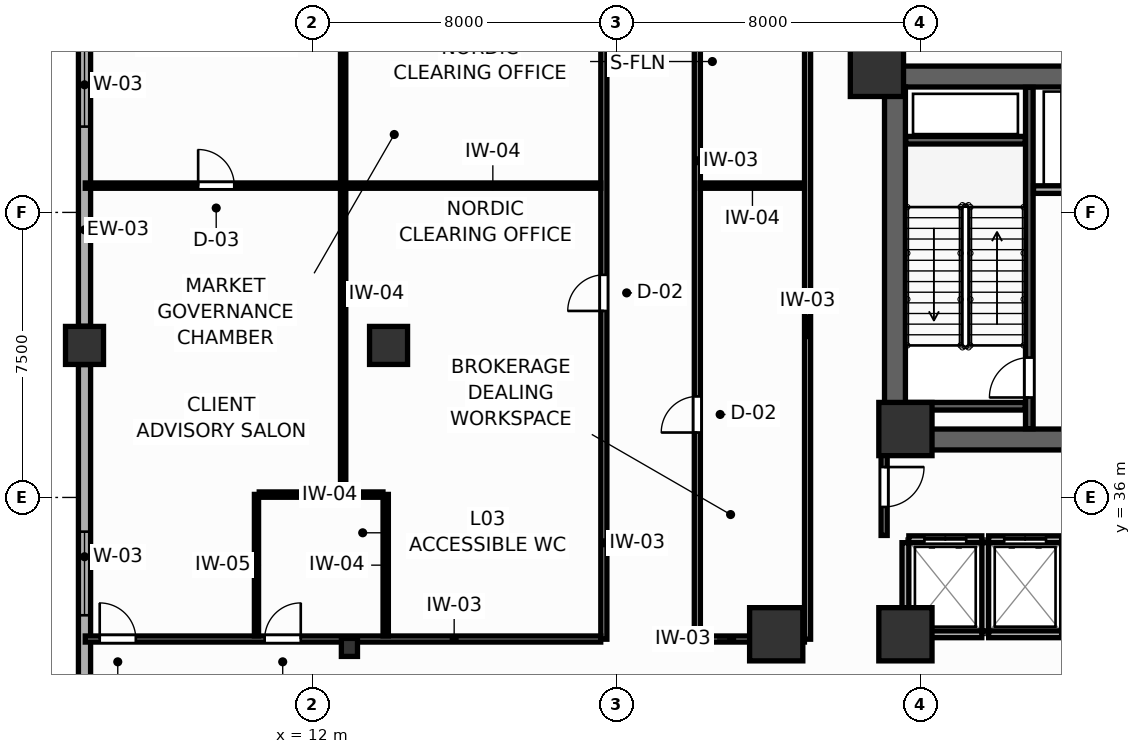
"""IFC4 building model, lengths in metres.
Left out: names, types, materials, properties, quantities, classifications, styles, units other than length and angle.
Written with IfcOpenShell. Run it as: python <this file> out.ifc"""

import sys

from ifc_helpers import new_model, si_unit, direction, frame, frame_2d, origin, origin_2d, place, context, subcontext, project, spatial, rectangle, i_section, extrude, source, transform, mapped, element, fill, save


model = new_model("IFC4")
c1 = context("Model", 3, precision=1e-05, world=origin(), true_north=direction((0.0, 1.0)))
c2 = subcontext(c1, "Body", "Model", "MODEL_VIEW")
j1 = project(units=[si_unit("LENGTHUNIT", "METRE"), si_unit("PLANEANGLEUNIT", "RADIAN")], contexts=[c1])
p1 = place(None, origin())
s1 = spatial("IfcSite", under=j1, at=p1, CompositionType="ELEMENT")
p2 = place(p1, origin())
s2 = spatial("IfcBuilding", under=s1, at=p2, CompositionType="ELEMENT")
p3 = place(p2, frame((0.0, 0.0, 14.4)))
s3 = spatial("IfcBuildingStorey", under=s2, at=p3, CompositionType="ELEMENT", Elevation=14.4)
p4 = place(p3, frame((27.05, 47.075, 0.0), z_axis=(0.0, 0.0, 1.0), x_axis=(1.0, 0.0, 0.0)))
e1 = element("IfcWall", 1, at=p4, inside=s3, PredefinedType="SHEAR", context=c2, shape_type="SweptSolid", body=[
    extrude(rectangle(XDim=17.9, YDim=0.55, at=frame_2d((8.95, 0.0))), origin(), (0.0, 0.0, 1.0), 4.8),
])
p5 = place(p3, frame((27.05, 37.525, 0.0), z_axis=(0.0, 0.0, 1.0), x_axis=(1.0, 0.0, 0.0)))
e2 = element("IfcWall", 2, at=p5, inside=s3, PredefinedType="SHEAR", context=c2, shape_type="SweptSolid", body=[
    extrude(rectangle(XDim=17.9, YDim=0.55, at=frame_2d((8.95, 0.0))), origin(), (0.0, 0.0, 1.0), 4.8),
])
p6 = place(p5, frame((4.975, 0.0, 0.0)))
e3 = element("IfcOpeningElement", 3, at=p6, cuts=e2, PredefinedType="OPENING", context=c2, shape_type="SweptSolid", body=[
    extrude(rectangle(XDim=1.05, YDim=2.1, at=frame_2d((0.525, 1.05))), frame((0.0, 0.285, 0.0), z_axis=(0.0, -1.0, 0.0), x_axis=(1.0, 0.0, 0.0)), (0.0, 0.0, 1.0), 0.57),
])
p7 = place(p5, frame((11.875, 0.0, 0.0)))
e4 = element("IfcOpeningElement", 4, at=p7, cuts=e2, PredefinedType="OPENING", context=c2, shape_type="SweptSolid", body=[
    extrude(rectangle(XDim=1.05, YDim=2.1, at=frame_2d((0.525, 1.05))), frame((0.0, 0.285, 0.0), z_axis=(0.0, -1.0, 0.0), x_axis=(1.0, 0.0, 0.0)), (0.0, 0.0, 1.0), 0.57),
])
p8 = place(p3, frame((27.325, 37.8, 0.0), z_axis=(0.0, 0.0, 1.0), x_axis=(0.0, 1.0, 0.0)))
e5 = element("IfcWall", 5, at=p8, inside=s3, PredefinedType="SHEAR", context=c2, shape_type="SweptSolid", body=[
    extrude(rectangle(XDim=9.0, YDim=0.55, at=frame_2d((4.5, 0.0))), origin(), (0.0, 0.0, 1.0), 4.8),
])
m1 = source(origin(), c2, "Body", "SweptSolid", [
    extrude(rectangle(XDim=1.4, YDim=1.4, at=origin_2d()), origin(), (0.0, 0.0, 1.0), 4.8),
])
for number, where, z_axis, x_axis in (
    (6, (26.85, 47.25, 0.0), (0.0, 0.0, 1.0), (1.0, 0.0, 0.0)),
    (7, (27.6, 37.8, 0.0), (0.0, 0.0, 1.0), (1.0, 0.0, 0.0)),
    (8, (27.6, 32.4, 0.0), (0.0, 0.0, 1.0), (1.0, 0.0, 0.0)),
    (9, (24.2, 32.4, 0.0), (0.0, 0.0, 1.0), (1.0, 0.0, 0.0)),
):
    element("IfcColumn", number, at=place(p3, frame(where, z_axis=z_axis, x_axis=x_axis)), inside=s3, PredefinedType="COLUMN", context=c2, shape_type="MappedRepresentation", body=[
        mapped(m1, transform((0.0, 0.0, 0.0), scale=1.0)),
    ])
m2 = source(origin(), c2, "Body", "SweptSolid", [
    extrude(rectangle(XDim=1.0, YDim=1.0, at=origin_2d()), origin(), (0.0, 0.0, 1.0), 4.8),
])
for number, where, z_axis, x_axis in (
    (10, (6.0, 40.0, 0.0), (0.0, 0.0, 1.0), (1.0, 0.0, 0.0)),
    (11, (14.0, 40.0, 0.0), (0.0, 0.0, 1.0), (1.0, 0.0, 0.0)),
):
    element("IfcColumn", number, at=place(p3, frame(where, z_axis=z_axis, x_axis=x_axis)), inside=s3, PredefinedType="COLUMN", context=c2, shape_type="MappedRepresentation", body=[
        mapped(m2, transform((0.0, 0.0, 0.0), scale=1.0)),
    ])
m3 = source(origin(), c2, "Body", "SweptSolid", [
    extrude(i_section(OverallWidth=0.424, OverallDepth=0.474, WebThickness=0.045, FlangeThickness=0.072, FilletRadius=0.015, at=origin_2d()), origin(), (0.0, 0.0, 1.0), 4.8),
])
p9 = place(p3, frame((12.97, 32.054, 0.0), z_axis=(0.0, 0.0, 1.0), x_axis=(1.0, 0.0, 0.0)))
e12 = element("IfcColumn", 12, at=p9, inside=s3, PredefinedType="COLUMN", context=c2, shape_type="MappedRepresentation", body=[
    mapped(m3, transform((0.0, 0.0, 0.0), scale=1.0)),
])
p10 = place(p3, frame((6.0, 28.505, 0.0), z_axis=(0.0, 0.0, 1.0), x_axis=(0.0, 1.0, 0.0)))
e13 = element("IfcWall", 13, at=p10, inside=s3, PredefinedType="SOLIDWALL", context=c2, shape_type="SweptSolid", body=[
    extrude(rectangle(XDim=10.99, YDim=0.32, at=frame_2d((5.495, 0.0))), origin(), (0.0, 0.0, 1.0), 3.82),
])
p11 = place(p10, frame((4.395, 0.0, 0.75)))
e14 = element("IfcOpeningElement", 14, at=p11, cuts=e13, PredefinedType="OPENING", context=c2, shape_type="SweptSolid", body=[
    extrude(rectangle(XDim=2.2, YDim=2.0, at=frame_2d((1.1, 1.0))), frame((0.0, 0.17, 0.0), z_axis=(0.0, -1.0, 0.0), x_axis=(1.0, 0.0, 0.0)), (0.0, 0.0, 1.0), 0.34),
])
p12 = place(p3, frame((6.0, 40.505, 0.0), z_axis=(0.0, 0.0, 1.0), x_axis=(0.0, 1.0, 0.0)))
e15 = element("IfcWall", 15, at=p12, inside=s3, PredefinedType="SOLIDWALL", context=c2, shape_type="SweptSolid", body=[
    extrude(rectangle(XDim=9.47, YDim=0.32, at=frame_2d((4.735, 0.0))), origin(), (0.0, 0.0, 1.0), 3.82),
])
p13 = place(p12, frame((5.253, 0.0, 0.75)))
e16 = element("IfcOpeningElement", 16, at=p13, cuts=e15, PredefinedType="OPENING", context=c2, shape_type="SweptSolid", body=[
    extrude(rectangle(XDim=2.2, YDim=2.0, at=frame_2d((1.1, 1.0))), frame((0.0, 0.17, 0.0), z_axis=(0.0, -1.0, 0.0), x_axis=(1.0, 0.0, 0.0)), (0.0, 0.0, 1.0), 0.34),
])
p14 = place(p3, frame((30.86, 37.81, 0.0), z_axis=(0.0, 0.0, 1.0), x_axis=(0.0, 1.0, 0.0)))
e17 = element("IfcWall", 17, at=p14, inside=s3, PredefinedType="SHEAR", context=c2, shape_type="SweptSolid", body=[
    extrude(rectangle(XDim=8.98, YDim=0.2, at=frame_2d((4.49, 0.0))), origin(), (0.0, 0.0, 1.0), 4.8),
])
p15 = place(p14, frame((0.82, 0.0, 0.0)))
e18 = element("IfcOpeningElement", 18, at=p15, cuts=e17, PredefinedType="OPENING", context=c2, shape_type="SweptSolid", body=[
    extrude(rectangle(XDim=1.05, YDim=2.1, at=frame_2d((0.525, 1.05))), frame((0.0, 0.11, 0.0), z_axis=(0.0, -1.0, 0.0), x_axis=(1.0, 0.0, 0.0)), (0.0, 0.0, 1.0), 0.22),
])
for number, where, z_axis, x_axis in (
    (19, (27.61, 45.4, 0.0), (0.0, 0.0, 1.0), (1.0, 0.0, 0.0)),
    (20, (27.61, 38.4, 0.0), (0.0, 0.0, 1.0), (1.0, 0.0, 0.0)),
):
    element("IfcWall", number, at=place(p3, frame(where, z_axis=z_axis, x_axis=x_axis)), inside=s3, PredefinedType="SHEAR", context=c2, shape_type="SweptSolid", body=[
        extrude(rectangle(XDim=3.14, YDim=0.2, at=frame_2d((1.57, 0.0))), origin(), (0.0, 0.0, 1.0), 4.8),
    ])
p16 = place(p3, frame((30.97, 44.1, 0.0), z_axis=(0.0, 0.0, 1.0), x_axis=(1.0, 0.0, 0.0)))
e21 = element("IfcWall", 21, at=p16, inside=s3, PredefinedType="PARTITIONING", context=c2, shape_type="SweptSolid", body=[
    extrude(rectangle(XDim=3.38, YDim=0.2, at=frame_2d((1.69, 0.0))), origin(), (0.0, 0.0, 1.0), 4.52),
])
p17 = place(p16, frame((0.9, 0.0, 0.0)))
e22 = element("IfcOpeningElement", 22, at=p17, cuts=e21, PredefinedType="OPENING", context=c2, shape_type="SweptSolid", body=[
    extrude(rectangle(XDim=1.2, YDim=2.1, at=frame_2d((0.6, 1.05))), frame((0.0, 0.11, 0.0), z_axis=(0.0, -1.0, 0.0), x_axis=(1.0, 0.0, 0.0)), (0.0, 0.0, 1.0), 0.22),
])
p18 = place(p3, frame((27.69, 34.9, 0.0), z_axis=(0.0, 0.0, 1.0), x_axis=(1.0, 0.0, 0.0)))
e23 = element("IfcWall", 23, at=p18, inside=s3, PredefinedType="PARTITIONING", context=c2, shape_type="SweptSolid", body=[
    extrude(rectangle(XDim=1.92, YDim=0.18, at=frame_2d((0.96, 0.0))), origin(), (0.0, 0.0, 1.0), 4.52),
])
p19 = place(p18, frame((0.41, 0.0, 0.0)))
e24 = element("IfcOpeningElement", 24, at=p19, cuts=e23, PredefinedType="OPENING", context=c2, shape_type="SweptSolid", body=[
    extrude(rectangle(XDim=1.1, YDim=2.1, at=frame_2d((0.55, 1.05))), frame((0.0, 0.1, 0.0), z_axis=(0.0, -1.0, 0.0), x_axis=(1.0, 0.0, 0.0)), (0.0, 0.0, 1.0), 0.2),
])
p20 = place(p3, frame((27.69, 32.4, 0.0), z_axis=(0.0, 0.0, 1.0), x_axis=(1.0, 0.0, 0.0)))
e25 = element("IfcWall", 25, at=p20, inside=s3, PredefinedType="PARTITIONING", context=c2, shape_type="SweptSolid", body=[
    extrude(rectangle(XDim=1.92, YDim=0.18, at=frame_2d((0.96, 0.0))), origin(), (0.0, 0.0, 1.0), 3.82),
])
p21 = place(p3, frame((27.6, 32.49, 0.0), z_axis=(0.0, 0.0, 1.0), x_axis=(0.0, 1.0, 0.0)))
e26 = element("IfcWall", 26, at=p21, inside=s3, PredefinedType="PARTITIONING", context=c2, shape_type="SweptSolid", body=[
    extrude(rectangle(XDim=2.32, YDim=0.18, at=frame_2d((1.16, 0.0))), origin(), (0.0, 0.0, 1.0), 4.52),
])
p22 = place(p3, frame((29.79, 34.9, 0.0), z_axis=(0.0, 0.0, 1.0), x_axis=(1.0, 0.0, 0.0)))
e27 = element("IfcWall", 27, at=p22, inside=s3, PredefinedType="PARTITIONING", context=c2, shape_type="SweptSolid", body=[
    extrude(rectangle(XDim=1.92, YDim=0.18, at=frame_2d((0.96, 0.0))), origin(), (0.0, 0.0, 1.0), 4.52),
])
p23 = place(p22, frame((0.41, 0.0, 0.0)))
e28 = element("IfcOpeningElement", 28, at=p23, cuts=e27, PredefinedType="OPENING", context=c2, shape_type="SweptSolid", body=[
    extrude(rectangle(XDim=1.1, YDim=2.1, at=frame_2d((0.55, 1.05))), frame((0.0, 0.1, 0.0), z_axis=(0.0, -1.0, 0.0), x_axis=(1.0, 0.0, 0.0)), (0.0, 0.0, 1.0), 0.2),
])
p24 = place(p3, frame((29.79, 32.4, 0.0), z_axis=(0.0, 0.0, 1.0), x_axis=(1.0, 0.0, 0.0)))
e29 = element("IfcWall", 29, at=p24, inside=s3, PredefinedType="PARTITIONING", context=c2, shape_type="SweptSolid", body=[
    extrude(rectangle(XDim=1.92, YDim=0.18, at=frame_2d((0.96, 0.0))), origin(), (0.0, 0.0, 1.0), 3.82),
])
p25 = place(p3, frame((29.7, 32.49, 0.0), z_axis=(0.0, 0.0, 1.0), x_axis=(0.0, 1.0, 0.0)))
e30 = element("IfcWall", 30, at=p25, inside=s3, PredefinedType="PARTITIONING", context=c2, shape_type="SweptSolid", body=[
    extrude(rectangle(XDim=2.32, YDim=0.18, at=frame_2d((1.16, 0.0))), origin(), (0.0, 0.0, 1.0), 4.52),
])
p26 = place(p3, frame((27.04, 35.0, 0.0), z_axis=(0.0, 0.0, 1.0), x_axis=(0.0, 1.0, 0.0)))
e31 = element("IfcWall", 31, at=p26, inside=s3, PredefinedType="PARTITIONING", context=c2, shape_type="SweptSolid", body=[
    extrude(rectangle(XDim=2.65, YDim=0.16, at=frame_2d((1.325, 0.0))), origin(), (0.0, 0.0, 1.0), 4.52),
])
p27 = place(p26, frame((0.75, 0.0, 0.0)))
e32 = element("IfcOpeningElement", 32, at=p27, cuts=e31, PredefinedType="OPENING", context=c2, shape_type="SweptSolid", body=[
    extrude(rectangle(XDim=1.05, YDim=2.1, at=frame_2d((0.525, 1.05))), frame((0.0, 0.09, 0.0), z_axis=(0.0, -1.0, 0.0), x_axis=(1.0, 0.0, 0.0)), (0.0, 0.0, 1.0), 0.18),
])
p28 = place(p3, frame((22.125, 32.27, 0.0), z_axis=(0.0, 0.0, 1.0), x_axis=(0.0, 1.0, 0.0)))
e33 = element("IfcWall", 33, at=p28, inside=s3, PredefinedType="PARTITIONING", context=c2, shape_type="SweptSolid", body=[
    extrude(rectangle(XDim=26.71, YDim=0.16, at=frame_2d((13.355, 0.0))), origin(), (0.0, 0.0, 1.0), 4.52),
])
p29 = place(p28, frame((5.438, 0.0, 0.0)))
e34 = element("IfcOpeningElement", 34, at=p29, cuts=e33, PredefinedType="OPENING", context=c2, shape_type="SweptSolid", body=[
    extrude(rectangle(XDim=0.95, YDim=2.05, at=frame_2d((0.475, 1.025))), frame((0.0, 0.09, 0.0), z_axis=(0.0, -1.0, 0.0), x_axis=(1.0, 0.0, 0.0)), (0.0, 0.0, 1.0), 0.18),
])
p30 = place(p28, frame((18.79, 0.0, 0.0)))
e35 = element("IfcOpeningElement", 35, at=p30, cuts=e33, PredefinedType="OPENING", context=c2, shape_type="SweptSolid", body=[
    extrude(rectangle(XDim=0.95, YDim=2.05, at=frame_2d((0.475, 1.025))), frame((0.0, 0.09, 0.0), z_axis=(0.0, -1.0, 0.0), x_axis=(1.0, 0.0, 0.0)), (0.0, 0.0, 1.0), 0.18),
])
p31 = place(p3, frame((25.025, 32.27, 0.0), z_axis=(0.0, 0.0, 1.0), x_axis=(0.0, 1.0, 0.0)))
e36 = element("IfcWall", 36, at=p31, inside=s3, PredefinedType="PARTITIONING", context=c2, shape_type="SweptSolid", body=[
    extrude(rectangle(XDim=26.71, YDim=0.16, at=frame_2d((13.355, 0.0))), origin(), (0.0, 0.0, 1.0), 4.52),
])
p32 = place(p3, frame((19.665, 32.27, 0.0), z_axis=(0.0, 0.0, 1.0), x_axis=(0.0, 1.0, 0.0)))
e37 = element("IfcWall", 37, at=p32, inside=s3, PredefinedType="PARTITIONING", context=c2, shape_type="SweptSolid", body=[
    extrude(rectangle(XDim=16.71, YDim=0.16, at=frame_2d((8.355, 0.0))), origin(), (0.0, 0.0, 1.0), 4.52),
])
p33 = place(p32, frame((8.637, 0.0, 0.0)))
e38 = element("IfcOpeningElement", 38, at=p33, cuts=e37, PredefinedType="OPENING", context=c2, shape_type="SweptSolid", body=[
    extrude(rectangle(XDim=0.95, YDim=2.05, at=frame_2d((0.475, 1.025))), frame((0.0, 0.09, 0.0), z_axis=(0.0, -1.0, 0.0), x_axis=(1.0, 0.0, 0.0)), (0.0, 0.0, 1.0), 0.18),
])
p34 = place(p3, frame((6.02, 32.275, 0.0), z_axis=(0.0, 0.0, 1.0), x_axis=(1.0, 0.0, 0.0)))
e39 = element("IfcWall", 39, at=p34, inside=s3, PredefinedType="PARTITIONING", context=c2, shape_type="SweptSolid", body=[
    extrude(rectangle(XDim=13.563, YDim=0.16, at=frame_2d((6.781, 0.0))), origin(), (0.0, 0.0, 1.0), 3.82),
])
p35 = place(p34, frame((4.72, 0.0, 0.0)))
e40 = element("IfcOpeningElement", 40, at=p35, cuts=e39, PredefinedType="OPENING", context=c2, shape_type="SweptSolid", body=[
    extrude(rectangle(XDim=0.95, YDim=2.05, at=frame_2d((0.475, 1.025))), frame((0.0, 0.09, 0.0), z_axis=(0.0, -1.0, 0.0), x_axis=(1.0, 0.0, 0.0)), (0.0, 0.0, 1.0), 0.18),
])
p36 = place(p34, frame((0.38, 0.0, 0.0)))
e41 = element("IfcOpeningElement", 41, at=p36, cuts=e39, PredefinedType="OPENING", context=c2, shape_type="SweptSolid", body=[
    extrude(rectangle(XDim=0.95, YDim=2.05, at=frame_2d((0.475, 1.025))), frame((0.0, 0.09, 0.0), z_axis=(0.0, -1.0, 0.0), x_axis=(1.0, 0.0, 0.0)), (0.0, 0.0, 1.0), 0.18),
])
p37 = place(p3, frame((27.035, 47.34, 0.0), z_axis=(0.0, 0.0, 1.0), x_axis=(0.0, 1.0, 0.0)))
e42 = element("IfcWall", 42, at=p37, inside=s3, PredefinedType="PARTITIONING", context=c2, shape_type="SweptSolid", body=[
    extrude(rectangle(XDim=11.64, YDim=0.16, at=frame_2d((5.82, 0.0))), origin(), (0.0, 0.0, 1.0), 4.52),
])
p38 = place(p37, frame((5.238, 0.0, 0.0)))
e43 = element("IfcOpeningElement", 43, at=p38, cuts=e42, PredefinedType="OPENING", context=c2, shape_type="SweptSolid", body=[
    extrude(rectangle(XDim=0.95, YDim=2.05, at=frame_2d((0.475, 1.025))), frame((0.0, 0.09, 0.0), z_axis=(0.0, -1.0, 0.0), x_axis=(1.0, 0.0, 0.0)), (0.0, 0.0, 1.0), 0.18),
])
p39 = place(p3, frame((22.207, 32.275, 0.0), z_axis=(0.0, 0.0, 1.0), x_axis=(1.0, 0.0, 0.0)))
e44 = element("IfcWall", 44, at=p39, inside=s3, PredefinedType="PARTITIONING", context=c2, shape_type="SweptSolid", body=[
    extrude(rectangle(XDim=2.736, YDim=0.16, at=frame_2d((1.368, 0.0))), origin(), (0.0, 0.0, 1.0), 3.82),
])
p40 = place(p3, frame((12.805, 36.06, 0.0), z_axis=(0.0, 0.0, 1.0), x_axis=(0.0, 1.0, 0.0)))
e45 = element("IfcWall", 45, at=p40, inside=s3, PredefinedType="PARTITIONING", context=c2, shape_type="SweptSolid", body=[
    extrude(rectangle(XDim=22.92, YDim=0.14, at=frame_2d((11.46, 0.0))), origin(), (0.0, 0.0, 1.0), 4.52),
])
p41 = place(p40, frame((17.789, 0.0, 0.0)))
e46 = element("IfcOpeningElement", 46, at=p41, cuts=e45, PredefinedType="OPENING", context=c2, shape_type="SweptSolid", body=[
    extrude(rectangle(XDim=0.95, YDim=2.05, at=frame_2d((0.475, 1.025))), frame((0.0, 0.08, 0.0), z_axis=(0.0, -1.0, 0.0), x_axis=(1.0, 0.0, 0.0)), (0.0, 0.0, 1.0), 0.16),
])
p42 = place(p3, frame((6.02, 44.205, 0.0), z_axis=(0.0, 0.0, 1.0), x_axis=(1.0, 0.0, 0.0)))
e47 = element("IfcWall", 47, at=p42, inside=s3, PredefinedType="PARTITIONING", context=c2, shape_type="SweptSolid", body=[
    extrude(rectangle(XDim=13.563, YDim=0.14, at=frame_2d((6.781, 0.0))), origin(), (0.0, 0.0, 1.0), 4.52),
])
p43 = place(p42, frame((2.97, 0.0, 0.0)))
e48 = element("IfcOpeningElement", 48, at=p43, cuts=e47, PredefinedType="OPENING", context=c2, shape_type="SweptSolid", body=[
    extrude(rectangle(XDim=0.95, YDim=2.05, at=frame_2d((0.475, 1.025))), frame((0.0, 0.08, 0.0), z_axis=(0.0, -1.0, 0.0), x_axis=(1.0, 0.0, 0.0)), (0.0, 0.0, 1.0), 0.16),
])
p44 = place(p3, frame((10.525, 32.357, 0.0), z_axis=(0.0, 0.0, 1.0), x_axis=(0.0, 1.0, 0.0)))
e49 = element("IfcWall", 49, at=p44, inside=s3, PredefinedType="MOVABLE", context=c2, shape_type="SweptSolid", body=[
    extrude(rectangle(XDim=3.723, YDim=0.11, at=frame_2d((1.862, 0.0))), origin(), (0.0, 0.0, 1.0), 4.52),
])
p45 = place(p3, frame((13.925, 32.357, 0.0), z_axis=(0.0, 0.0, 1.0), x_axis=(0.0, 1.0, 0.0)))
e50 = element("IfcWall", 50, at=p45, inside=s3, PredefinedType="PARTITIONING", context=c2, shape_type="SweptSolid", body=[
    extrude(rectangle(XDim=3.723, YDim=0.14, at=frame_2d((1.862, 0.0))), origin(), (0.0, 0.0, 1.0), 3.82),
])
p46 = place(p3, frame((10.597, 36.075, 0.0), z_axis=(0.0, 0.0, 1.0), x_axis=(1.0, 0.0, 0.0)))
e51 = element("IfcWall", 51, at=p46, inside=s3, PredefinedType="PARTITIONING", context=c2, shape_type="SweptSolid", body=[
    extrude(rectangle(XDim=3.256, YDim=0.14, at=frame_2d((1.628, 0.0))), origin(), (0.0, 0.0, 1.0), 4.52),
])
p47 = place(p3, frame((22.207, 44.205, 0.0), z_axis=(0.0, 0.0, 1.0), x_axis=(1.0, 0.0, 0.0)))
e52 = element("IfcWall", 52, at=p47, inside=s3, PredefinedType="PARTITIONING", context=c2, shape_type="SweptSolid", body=[
    extrude(rectangle(XDim=2.736, YDim=0.14, at=frame_2d((1.368, 0.0))), origin(), (0.0, 0.0, 1.0), 4.52),
])
p48 = place(p11, origin())
e53 = element("IfcWindow", 53, at=p48, inside=s3, PartitioningType="SINGLE_PANEL", PredefinedType="WINDOW", context=c2, shape_type="SweptSolid", body=[
    extrude(rectangle(XDim=2.2, YDim=2.0, at=frame_2d((1.1, 1.0))), frame((0.0, 0.03, 0.0), z_axis=(0.0, -1.0, 0.0), x_axis=(1.0, 0.0, 0.0)), (0.0, 0.0, 1.0), 0.06),
])
fill(e14, e53)
p49 = place(p13, origin())
e54 = element("IfcWindow", 54, at=p49, inside=s3, PartitioningType="SINGLE_PANEL", PredefinedType="WINDOW", context=c2, shape_type="SweptSolid", body=[
    extrude(rectangle(XDim=2.2, YDim=2.0, at=frame_2d((1.1, 1.0))), frame((0.0, 0.03, 0.0), z_axis=(0.0, -1.0, 0.0), x_axis=(1.0, 0.0, 0.0)), (0.0, 0.0, 1.0), 0.06),
])
fill(e16, e54)
p50 = place(p15, origin())
e55 = element("IfcDoor", 55, at=p50, inside=s3, OperationType="SINGLE_SWING_LEFT", PredefinedType="DOOR", context=c2, shape_type="SweptSolid", body=[
    extrude(rectangle(XDim=1.05, YDim=2.1, at=frame_2d((0.525, 1.05))), frame((0.0, 0.025, 0.0), z_axis=(0.0, -1.0, 0.0), x_axis=(1.0, 0.0, 0.0)), (0.0, 0.0, 1.0), 0.05),
])
fill(e18, e55)
p51 = place(p19, origin())
e56 = element("IfcDoor", 56, at=p51, inside=s3, OperationType="DOUBLE_DOOR_SLIDING", PredefinedType="DOOR", context=c2, shape_type="SweptSolid", body=[
    extrude(rectangle(XDim=1.1, YDim=2.1, at=frame_2d((0.55, 1.05))), frame((0.0, 0.025, 0.0), z_axis=(0.0, -1.0, 0.0), x_axis=(1.0, 0.0, 0.0)), (0.0, 0.0, 1.0), 0.05),
])
fill(e24, e56)
p52 = place(p23, origin())
e57 = element("IfcDoor", 57, at=p52, inside=s3, OperationType="DOUBLE_DOOR_SLIDING", PredefinedType="DOOR", context=c2, shape_type="SweptSolid", body=[
    extrude(rectangle(XDim=1.1, YDim=2.1, at=frame_2d((0.55, 1.05))), frame((0.0, 0.025, 0.0), z_axis=(0.0, -1.0, 0.0), x_axis=(1.0, 0.0, 0.0)), (0.0, 0.0, 1.0), 0.05),
])
fill(e28, e57)
p53 = place(p27, frame((1.05, 0.0, 0.0), z_axis=(0.0, 0.0, 1.0), x_axis=(-1.0, 0.0, 0.0)))
e58 = element("IfcDoor", 58, at=p53, inside=s3, OperationType="SINGLE_SWING_LEFT", PredefinedType="DOOR", context=c2, shape_type="SweptSolid", body=[
    extrude(rectangle(XDim=1.05, YDim=2.1, at=frame_2d((0.525, 1.05))), frame((0.0, 0.025, 0.0), z_axis=(0.0, -1.0, 0.0), x_axis=(1.0, 0.0, 0.0)), (0.0, 0.0, 1.0), 0.05),
])
fill(e32, e58)
p54 = place(p29, origin())
e59 = element("IfcDoor", 59, at=p54, inside=s3, OperationType="SINGLE_SWING_LEFT", PredefinedType="DOOR", context=c2, shape_type="SweptSolid", body=[
    extrude(rectangle(XDim=0.95, YDim=2.05, at=frame_2d((0.475, 1.025))), frame((0.0, 0.025, 0.0), z_axis=(0.0, -1.0, 0.0), x_axis=(1.0, 0.0, 0.0)), (0.0, 0.0, 1.0), 0.05),
])
fill(e34, e59)
p55 = place(p33, origin())
e60 = element("IfcDoor", 60, at=p55, inside=s3, OperationType="SINGLE_SWING_LEFT", PredefinedType="DOOR", context=c2, shape_type="SweptSolid", body=[
    extrude(rectangle(XDim=0.95, YDim=2.05, at=frame_2d((0.475, 1.025))), frame((0.0, 0.025, 0.0), z_axis=(0.0, -1.0, 0.0), x_axis=(1.0, 0.0, 0.0)), (0.0, 0.0, 1.0), 0.05),
])
fill(e38, e60)
p56 = place(p35, origin())
e61 = element("IfcDoor", 61, at=p56, inside=s3, OperationType="SINGLE_SWING_RIGHT", PredefinedType="DOOR", context=c2, shape_type="SweptSolid", body=[
    extrude(rectangle(XDim=0.95, YDim=2.05, at=frame_2d((0.475, 1.025))), frame((0.0, 0.025, 0.0), z_axis=(0.0, -1.0, 0.0), x_axis=(1.0, 0.0, 0.0)), (0.0, 0.0, 1.0), 0.05),
])
fill(e40, e61)
p57 = place(p36, origin())
e62 = element("IfcDoor", 62, at=p57, inside=s3, OperationType="SINGLE_SWING_LEFT", PredefinedType="DOOR", context=c2, shape_type="SweptSolid", body=[
    extrude(rectangle(XDim=0.95, YDim=2.05, at=frame_2d((0.475, 1.025))), frame((0.0, 0.025, 0.0), z_axis=(0.0, -1.0, 0.0), x_axis=(1.0, 0.0, 0.0)), (0.0, 0.0, 1.0), 0.05),
])
fill(e41, e62)
p58 = place(p43, origin())
e63 = element("IfcDoor", 63, at=p58, inside=s3, OperationType="SINGLE_SWING_LEFT", PredefinedType="DOOR", context=c2, shape_type="SweptSolid", body=[
    extrude(rectangle(XDim=0.95, YDim=2.05, at=frame_2d((0.475, 1.025))), frame((0.0, 0.025, 0.0), z_axis=(0.0, -1.0, 0.0), x_axis=(1.0, 0.0, 0.0)), (0.0, 0.0, 1.0), 0.05),
])
fill(e48, e63)
save(model, sys.argv[1])
